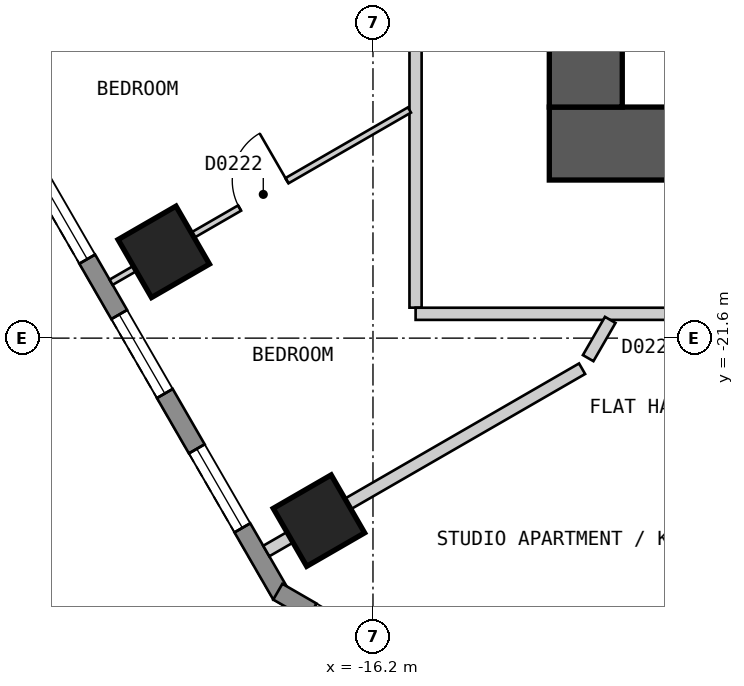
"""IFC4 building model, lengths in metres.
Left out: names, types, materials, properties, quantities, classifications, styles, units other than length and angle.
Written with IfcOpenShell. Run it as: python <this file> out.ifc"""

import sys

from ifc_helpers import new_model, si_unit, direction, frame, frame_2d, origin, origin_2d, place, context, subcontext, project, spatial, polyline, rectangle, outline, extrude, element, fill, save


model = new_model("IFC4")
c1 = context("Model", 3, precision=1e-05, world=origin(), true_north=direction((0.0, 1.0)))
c2 = subcontext(c1, "Body", "Model", "MODEL_VIEW")
j1 = project(units=[si_unit("LENGTHUNIT", "METRE"), si_unit("PLANEANGLEUNIT", "RADIAN")], contexts=[c1])
p1 = place(None, origin())
s1 = spatial("IfcSite", under=j1, at=p1, CompositionType="ELEMENT")
p2 = place(p1, origin())
s2 = spatial("IfcBuilding", under=s1, at=p2, CompositionType="ELEMENT")
p3 = place(p2, frame((0.0, 0.0, 47.4)))
s3 = spatial("IfcBuildingStorey", under=s2, at=p3, CompositionType="ELEMENT", Elevation=47.4)
for number, where, z_axis, x_axis in (
    (1, (-19.641, -20.181, 0.0), (0.0, 0.0, 1.0), (0.5, -0.866, 0.0)),
    (2, (-17.089, -24.601, 0.0), (0.0, 0.0, 1.0), (0.5, -0.866, 0.0)),
):
    element("IfcColumn", number, at=place(p3, frame(where, z_axis=z_axis, x_axis=x_axis)), inside=s3, PredefinedType="COLUMN", context=c2, shape_type="SweptSolid", body=[
        extrude(rectangle(XDim=1.1, YDim=1.1, at=origin_2d()), origin(), (0.0, 0.0, 1.0), 3.0),
    ])
p4 = place(p3, frame((-13.3, -18.4, 0.0), z_axis=(0.0, 0.0, 1.0), x_axis=(1.0, 0.0, 0.0)))
e3 = element("IfcWall", 3, at=p4, inside=s3, PredefinedType="SHEAR", context=c2, shape_type="SweptSolid", body=[
    extrude(rectangle(XDim=26.6, YDim=1.2, at=frame_2d((13.3, 0.0))), origin(), (0.0, 0.0, 1.0), 2.7),
])
p5 = place(p3, frame((-12.7, -17.8, 0.0), z_axis=(0.0, 0.0, 1.0), x_axis=(0.0, 1.0, 0.0)))
e4 = element("IfcWall", 4, at=p5, inside=s3, PredefinedType="SHEAR", context=c2, shape_type="SweptSolid", body=[
    extrude(rectangle(XDim=11.6, YDim=1.2, at=frame_2d((5.8, 0.0))), origin(), (0.0, 0.0, 1.0), 2.7),
])
p6 = place(p5, frame((3.6, 0.0, 0.0)))
e5 = element("IfcOpeningElement", 5, at=p6, cuts=e4, PredefinedType="OPENING", context=c2, shape_type="SweptSolid", body=[
    extrude(rectangle(XDim=1.2, YDim=2.1, at=frame_2d((0.6, 1.05))), frame((0.0, 0.61, 0.0), z_axis=(0.0, -1.0, 0.0), x_axis=(1.0, 0.0, 0.0)), (0.0, 0.0, 1.0), 1.22),
])
p7 = place(p3, frame((-31.22, -2.425, 0.0), z_axis=(0.0, 0.0, 1.0), x_axis=(0.500001938803, -0.866024284413, 0.0)))
e6 = element("IfcWall", 6, at=p7, inside=s3, PredefinedType="SOLIDWALL", context=c2, shape_type="SweptSolid", body=[
    extrude(outline(polyline([(0.0, -0.15), (27.02, -0.15), (26.94, 0.15), (0.08, 0.15), (0.0, -0.15)])), origin(), (0.0, 0.0, 1.0), 2.7),
])
p8 = place(p7, frame((1.277, 0.0, 0.15)))
e7 = element("IfcOpeningElement", 7, at=p8, cuts=e6, PredefinedType="OPENING", context=c2, shape_type="SweptSolid", body=[
    extrude(rectangle(XDim=1.5, YDim=2.1, at=frame_2d((0.75, 1.05))), frame((0.0, 0.16, 0.0), z_axis=(0.0, -1.0, 0.0), x_axis=(1.0, 0.0, 0.0)), (0.0, 0.0, 1.0), 0.32),
])
p9 = place(p7, frame((3.829, 0.0, 0.15)))
e8 = element("IfcOpeningElement", 8, at=p9, cuts=e6, PredefinedType="OPENING", context=c2, shape_type="SweptSolid", body=[
    extrude(rectangle(XDim=1.5, YDim=2.1, at=frame_2d((0.75, 1.05))), frame((0.0, 0.16, 0.0), z_axis=(0.0, -1.0, 0.0), x_axis=(1.0, 0.0, 0.0)), (0.0, 0.0, 1.0), 0.32),
])
p10 = place(p7, frame((6.382, 0.0, 0.15)))
e9 = element("IfcOpeningElement", 9, at=p10, cuts=e6, PredefinedType="OPENING", context=c2, shape_type="SweptSolid", body=[
    extrude(rectangle(XDim=1.5, YDim=2.1, at=frame_2d((0.75, 1.05))), frame((0.0, 0.16, 0.0), z_axis=(0.0, -1.0, 0.0), x_axis=(1.0, 0.0, 0.0)), (0.0, 0.0, 1.0), 0.32),
])
p11 = place(p7, frame((8.933, 0.0, 0.15)))
e10 = element("IfcOpeningElement", 10, at=p11, cuts=e6, PredefinedType="OPENING", context=c2, shape_type="SweptSolid", body=[
    extrude(rectangle(XDim=1.5, YDim=2.1, at=frame_2d((0.75, 1.05))), frame((0.0, 0.16, 0.0), z_axis=(0.0, -1.0, 0.0), x_axis=(1.0, 0.0, 0.0)), (0.0, 0.0, 1.0), 0.32),
])
p12 = place(p7, frame((11.485, 0.0, 0.15)))
e11 = element("IfcOpeningElement", 11, at=p12, cuts=e6, PredefinedType="OPENING", context=c2, shape_type="SweptSolid", body=[
    extrude(rectangle(XDim=1.5, YDim=2.1, at=frame_2d((0.75, 1.05))), frame((0.0, 0.16, 0.0), z_axis=(0.0, -1.0, 0.0), x_axis=(1.0, 0.0, 0.0)), (0.0, 0.0, 1.0), 0.32),
])
p13 = place(p7, frame((14.037, 0.0, 0.15)))
e12 = element("IfcOpeningElement", 12, at=p13, cuts=e6, PredefinedType="OPENING", context=c2, shape_type="SweptSolid", body=[
    extrude(rectangle(XDim=1.5, YDim=2.1, at=frame_2d((0.75, 1.05))), frame((0.0, 0.16, 0.0), z_axis=(0.0, -1.0, 0.0), x_axis=(1.0, 0.0, 0.0)), (0.0, 0.0, 1.0), 0.32),
])
p14 = place(p7, frame((16.589, 0.0, 0.15)))
e13 = element("IfcOpeningElement", 13, at=p14, cuts=e6, PredefinedType="OPENING", context=c2, shape_type="SweptSolid", body=[
    extrude(rectangle(XDim=1.5, YDim=2.1, at=frame_2d((0.75, 1.05))), frame((0.0, 0.16, 0.0), z_axis=(0.0, -1.0, 0.0), x_axis=(1.0, 0.0, 0.0)), (0.0, 0.0, 1.0), 0.32),
])
p15 = place(p7, frame((19.141, 0.0, 0.15)))
e14 = element("IfcOpeningElement", 14, at=p15, cuts=e6, PredefinedType="OPENING", context=c2, shape_type="SweptSolid", body=[
    extrude(rectangle(XDim=1.5, YDim=2.1, at=frame_2d((0.75, 1.05))), frame((0.0, 0.16, 0.0), z_axis=(0.0, -1.0, 0.0), x_axis=(1.0, 0.0, 0.0)), (0.0, 0.0, 1.0), 0.32),
])
p16 = place(p7, frame((21.693, 0.0, 0.15)))
e15 = element("IfcOpeningElement", 15, at=p16, cuts=e6, PredefinedType="OPENING", context=c2, shape_type="SweptSolid", body=[
    extrude(rectangle(XDim=1.5, YDim=2.1, at=frame_2d((0.75, 1.05))), frame((0.0, 0.16, 0.0), z_axis=(0.0, -1.0, 0.0), x_axis=(1.0, 0.0, 0.0)), (0.0, 0.0, 1.0), 0.32),
])
p17 = place(p7, frame((24.244, 0.0, 0.15)))
e16 = element("IfcOpeningElement", 16, at=p17, cuts=e6, PredefinedType="OPENING", context=c2, shape_type="SweptSolid", body=[
    extrude(rectangle(XDim=1.5, YDim=2.1, at=frame_2d((0.75, 1.05))), frame((0.0, 0.16, 0.0), z_axis=(0.0, -1.0, 0.0), x_axis=(1.0, 0.0, 0.0)), (0.0, 0.0, 1.0), 0.32),
])
p18 = place(p3, frame((-17.765, -25.77, 0.0), z_axis=(0.0, 0.0, 1.0), x_axis=(0.866010750942, -0.50002537861, 0.0)))
e17 = element("IfcWall", 17, at=p18, inside=s3, PredefinedType="SOLIDWALL", context=c2, shape_type="SweptSolid", body=[
    extrude(outline(polyline([(0.0, -0.15), (5.0, -0.15), (4.919, 0.15), (0.08, 0.15), (0.0, -0.15)])), origin(), (0.0, 0.0, 1.0), 2.7),
])
p19 = place(p18, frame((0.65, 0.0, 0.15)))
e18 = element("IfcOpeningElement", 18, at=p19, cuts=e17, PredefinedType="OPENING", context=c2, shape_type="SweptSolid", body=[
    extrude(rectangle(XDim=1.2, YDim=2.1, at=frame_2d((0.6, 1.05))), frame((0.0, 0.16, 0.0), z_axis=(0.0, -1.0, 0.0), x_axis=(1.0, 0.0, 0.0)), (0.0, 0.0, 1.0), 0.32),
])
p20 = place(p18, frame((3.15, 0.0, 0.15)))
e19 = element("IfcOpeningElement", 19, at=p20, cuts=e17, PredefinedType="OPENING", context=c2, shape_type="SweptSolid", body=[
    extrude(rectangle(XDim=1.2, YDim=2.1, at=frame_2d((0.6, 1.05))), frame((0.0, 0.16, 0.0), z_axis=(0.0, -1.0, 0.0), x_axis=(1.0, 0.0, 0.0)), (0.0, 0.0, 1.0), 0.32),
])
p21 = place(p3, frame((-15.5, -16.5, 0.0), z_axis=(0.0, 0.0, 1.0), x_axis=(0.0, -1.0, 0.0)))
e20 = element("IfcWall", 20, at=p21, inside=s3, PredefinedType="PARTITIONING", context=c2, shape_type="SweptSolid", body=[
    extrude(rectangle(XDim=4.599, YDim=0.2, at=frame_2d((2.3, 0.0))), origin(), (0.0, 0.0, 1.0), 2.7),
])
p22 = place(p3, frame((-15.499, -21.2, 0.0), z_axis=(0.0, 0.0, 1.0), x_axis=(1.0, 0.0, 0.0)))
e21 = element("IfcWall", 21, at=p22, inside=s3, PredefinedType="PARTITIONING", context=c2, shape_type="SweptSolid", body=[
    extrude(rectangle(XDim=30.898, YDim=0.2, at=frame_2d((15.449, 0.0))), origin(), (0.0, 0.0, 1.0), 2.7),
])
p23 = place(p22, frame((5.084, 0.0, 0.0)))
e22 = element("IfcOpeningElement", 22, at=p23, cuts=e21, PredefinedType="OPENING", context=c2, shape_type="SweptSolid", body=[
    extrude(rectangle(XDim=0.9, YDim=2.1, at=frame_2d((0.45, 1.05))), frame((0.0, 0.11, 0.0), z_axis=(0.0, -1.0, 0.0), x_axis=(1.0, 0.0, 0.0)), (0.0, 0.0, 1.0), 0.22),
])
p24 = place(p22, frame((15.0, 0.0, 0.0)))
e23 = element("IfcOpeningElement", 23, at=p24, cuts=e21, PredefinedType="OPENING", context=c2, shape_type="SweptSolid", body=[
    extrude(rectangle(XDim=1.0, YDim=2.1, at=frame_2d((0.5, 1.05))), frame((0.0, 0.11, 0.0), z_axis=(0.0, -1.0, 0.0), x_axis=(1.0, 0.0, 0.0)), (0.0, 0.0, 1.0), 0.22),
])
p25 = place(p22, frame((25.015, 0.0, 0.0)))
e24 = element("IfcOpeningElement", 24, at=p25, cuts=e21, PredefinedType="OPENING", context=c2, shape_type="SweptSolid", body=[
    extrude(rectangle(XDim=0.9, YDim=2.1, at=frame_2d((0.45, 1.05))), frame((0.0, 0.11, 0.0), z_axis=(0.0, -1.0, 0.0), x_axis=(1.0, 0.0, 0.0)), (0.0, 0.0, 1.0), 0.22),
])
p26 = place(p3, frame((-20.507, -20.681, 0.0), z_axis=(0.0, 0.0, 1.0), x_axis=(0.866028446103, 0.499994730513, 0.0)))
e25 = element("IfcWall", 25, at=p26, inside=s3, PredefinedType="PARTITIONING", context=c2, shape_type="SweptSolid", body=[
    extrude(rectangle(XDim=5.666, YDim=0.1, at=frame_2d((2.833, 0.0))), origin(), (0.0, 0.0, 1.0), 2.7),
])
p27 = place(p26, frame((2.44, 0.0, 0.0)))
e26 = element("IfcOpeningElement", 26, at=p27, cuts=e25, PredefinedType="OPENING", context=c2, shape_type="SweptSolid", body=[
    extrude(rectangle(XDim=0.9, YDim=2.1, at=frame_2d((0.45, 1.05))), frame((0.0, 0.06, 0.0), z_axis=(0.0, -1.0, 0.0), x_axis=(1.0, 0.0, 0.0)), (0.0, 0.0, 1.0), 0.12),
])
p28 = place(p3, frame((-12.661, -21.929, 0.0), z_axis=(0.0, 0.0, 1.0), x_axis=(0.499683639304, 0.866207977689, 0.0)))
e27 = element("IfcWall", 27, at=p28, inside=s3, PredefinedType="PARTITIONING", context=c2, shape_type="SweptSolid", body=[
    extrude(rectangle(XDim=0.726, YDim=0.2, at=frame_2d((0.363, 0.0))), origin(), (0.0, 0.0, 1.0), 2.7),
])
p29 = place(p3, frame((-17.955, -25.101, 0.0), z_axis=(0.0, 0.0, 1.0), x_axis=(0.866080519133, 0.499904525262, 0.0)))
e28 = element("IfcWall", 28, at=p29, inside=s3, PredefinedType="PARTITIONING", context=c2, shape_type="SweptSolid", body=[
    extrude(rectangle(XDim=5.997, YDim=0.2, at=frame_2d((2.999, 0.0))), origin(), (0.0, 0.0, 1.0), 2.7),
])
p30 = place(p15, origin())
e29 = element("IfcWindow", 29, at=p30, inside=s3, PartitioningType="SINGLE_PANEL", PredefinedType="WINDOW", context=c2, shape_type="SweptSolid", body=[
    extrude(rectangle(XDim=1.5, YDim=2.1, at=frame_2d((0.75, 1.05))), frame((0.0, 0.03, 0.0), z_axis=(0.0, -1.0, 0.0), x_axis=(1.0, 0.0, 0.0)), (0.0, 0.0, 1.0), 0.06),
])
fill(e14, e29)
p31 = place(p16, origin())
e30 = element("IfcWindow", 30, at=p31, inside=s3, PartitioningType="SINGLE_PANEL", PredefinedType="WINDOW", context=c2, shape_type="SweptSolid", body=[
    extrude(rectangle(XDim=1.5, YDim=2.1, at=frame_2d((0.75, 1.05))), frame((0.0, 0.03, 0.0), z_axis=(0.0, -1.0, 0.0), x_axis=(1.0, 0.0, 0.0)), (0.0, 0.0, 1.0), 0.06),
])
fill(e15, e30)
p32 = place(p17, origin())
e31 = element("IfcWindow", 31, at=p32, inside=s3, PartitioningType="SINGLE_PANEL", PredefinedType="WINDOW", context=c2, shape_type="SweptSolid", body=[
    extrude(rectangle(XDim=1.5, YDim=2.1, at=frame_2d((0.75, 1.05))), frame((0.0, 0.03, 0.0), z_axis=(0.0, -1.0, 0.0), x_axis=(1.0, 0.0, 0.0)), (0.0, 0.0, 1.0), 0.06),
])
fill(e16, e31)
p33 = place(p27, origin())
e32 = element("IfcDoor", 32, at=p33, inside=s3, OperationType="SINGLE_SWING_RIGHT", PredefinedType="DOOR", context=c2, shape_type="SweptSolid", body=[
    extrude(rectangle(XDim=0.9, YDim=2.1, at=frame_2d((0.45, 1.05))), frame((0.0, 0.025, 0.0), z_axis=(0.0, -1.0, 0.0), x_axis=(1.0, 0.0, 0.0)), (0.0, 0.0, 1.0), 0.05),
])
fill(e26, e32)
save(model, sys.argv[1])
